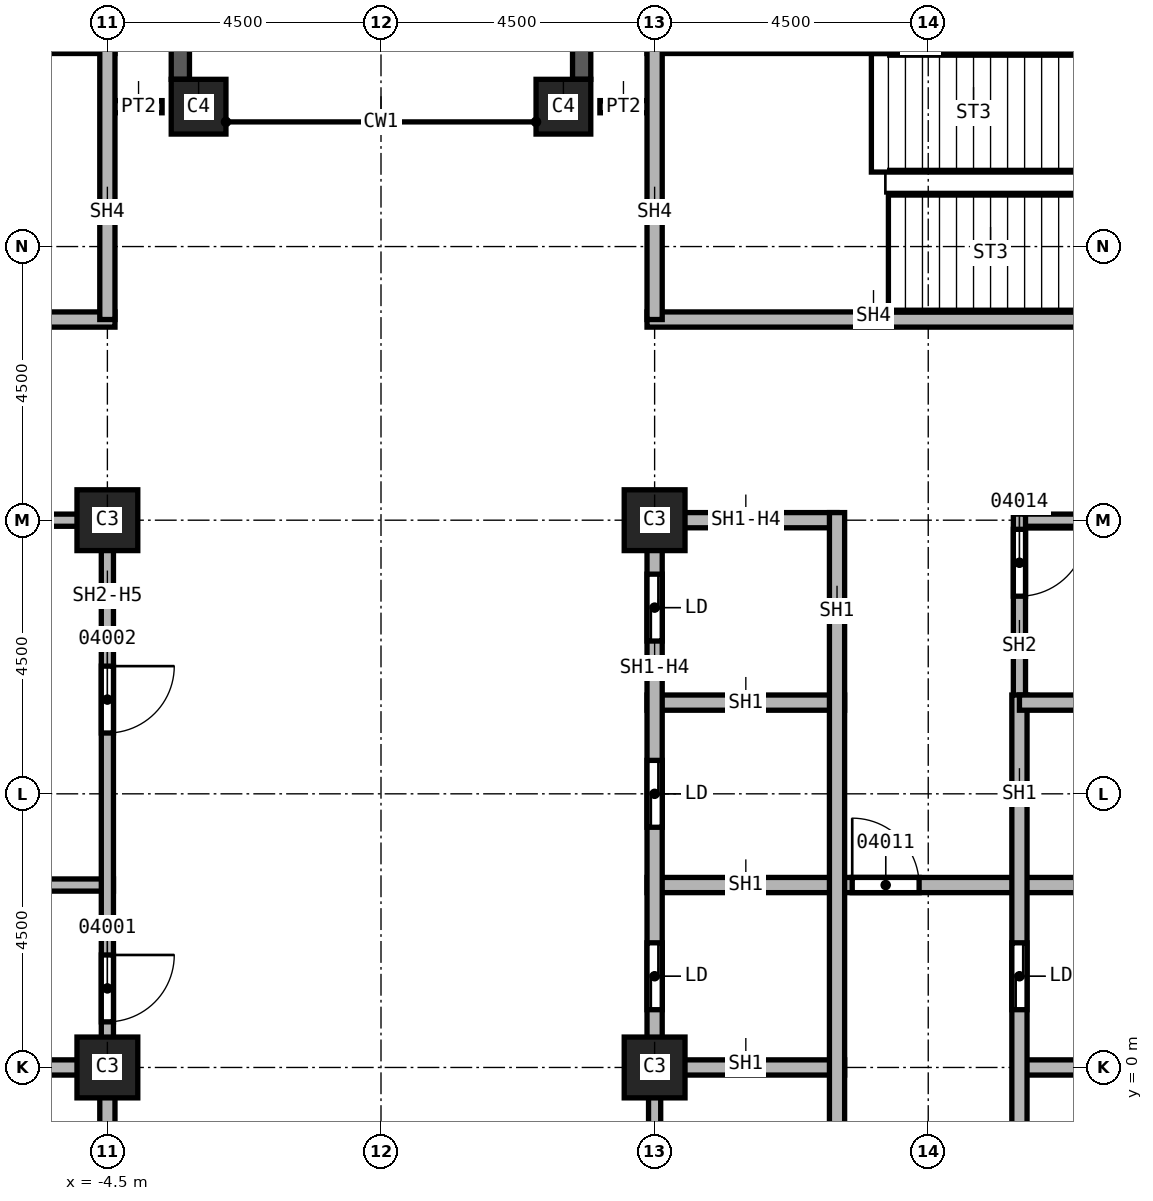
"""IFC4 building model, lengths in metres.
Left out: names, types, materials, properties, quantities, classifications, styles, units other than length and angle.
Written with IfcOpenShell. Run it as: python <this file> out.ifc"""

import sys

from ifc_helpers import new_model, si_unit, direction, frame, frame_2d, origin, origin_2d, place, context, subcontext, project, spatial, rectangle, extrude, element, fill, save


model = new_model("IFC4")
c1 = context("Model", 3, precision=1e-05, world=origin(), true_north=direction((0.0, 1.0)))
c2 = subcontext(c1, "Body", "Model", "MODEL_VIEW")
j1 = project(units=[si_unit("LENGTHUNIT", "METRE"), si_unit("PLANEANGLEUNIT", "RADIAN")], contexts=[c1])
p1 = place(None, origin())
s1 = spatial("IfcSite", under=j1, at=p1, CompositionType="ELEMENT")
p2 = place(p1, origin())
s2 = spatial("IfcBuilding", under=s1, at=p2, CompositionType="ELEMENT")
p3 = place(p2, frame((0.0, 0.0, 104.0)))
s3 = spatial("IfcBuildingStorey", under=s2, at=p3, CompositionType="ELEMENT", Elevation=104.0)
for number, where, z_axis, x_axis in (
    (1, (4.5, 0.0, 0.0), (0.0, 0.0, 1.0), (1.0, 0.0, 0.0)),
    (2, (4.5, 9.0, 0.0), (0.0, 0.0, 1.0), (1.0, 0.0, 0.0)),
    (3, (-4.5, 0.0, 0.0), (0.0, 0.0, 1.0), (1.0, 0.0, 0.0)),
    (4, (-4.5, 9.0, 0.0), (0.0, 0.0, 1.0), (1.0, 0.0, 0.0)),
):
    element("IfcColumn", number, at=place(p3, frame(where, z_axis=z_axis, x_axis=x_axis)), inside=s3, PredefinedType="COLUMN", context=c2, shape_type="SweptSolid", body=[
        extrude(rectangle(XDim=1.0, YDim=1.0, at=origin_2d()), origin(), (0.0, 0.0, 1.0), 3.7),
    ])
for number, where, z_axis, x_axis in (
    (5, (3.0, 15.8, 0.0), (0.0, 0.0, 1.0), (1.0, 0.0, 0.0)),
    (6, (-3.0, 15.8, 0.0), (0.0, 0.0, 1.0), (1.0, 0.0, 0.0)),
):
    element("IfcColumn", number, at=place(p3, frame(where, z_axis=z_axis, x_axis=x_axis)), inside=s3, PredefinedType="COLUMN", context=c2, shape_type="SweptSolid", body=[
        extrude(rectangle(XDim=0.9, YDim=0.9, at=origin_2d()), origin(), (0.0, 0.0, 1.0), 3.7),
    ])
p4 = place(p3, frame((3.3, 24.2, 0.0), z_axis=(0.0, 0.0, 1.0), x_axis=(0.0, -1.0, 0.0)))
e7 = element("IfcWall", 7, at=p4, inside=s3, PredefinedType="SOLIDWALL", context=c2, shape_type="SweptSolid", body=[
    extrude(rectangle(XDim=7.95, YDim=0.3, at=frame_2d((3.975, 0.0))), origin(), (0.0, 0.0, 1.0), 3.1),
])
p5 = place(p4, frame((0.788, 0.0, 0.8)))
e8 = element("IfcOpeningElement", 8, at=p5, cuts=e7, PredefinedType="OPENING", context=c2, shape_type="SweptSolid", body=[
    extrude(rectangle(XDim=2.4, YDim=1.95, at=frame_2d((1.2, 0.975))), frame((0.0, 0.15, 0.0), z_axis=(0.0, -1.0, 0.0), x_axis=(1.0, 0.0, 0.0)), (0.0, 0.0, 1.0), 0.3),
])
p6 = place(p4, frame((4.762, 0.0, 0.8)))
e9 = element("IfcOpeningElement", 9, at=p6, cuts=e7, PredefinedType="OPENING", context=c2, shape_type="SweptSolid", body=[
    extrude(rectangle(XDim=2.4, YDim=1.95, at=frame_2d((1.2, 0.975))), frame((0.0, 0.15, 0.0), z_axis=(0.0, -1.0, 0.0), x_axis=(1.0, 0.0, 0.0)), (0.0, 0.0, 1.0), 0.3),
])
p7 = place(p3, frame((-3.3, 16.25, 0.0), z_axis=(0.0, 0.0, 1.0), x_axis=(0.0, 1.0, 0.0)))
e10 = element("IfcWall", 10, at=p7, inside=s3, PredefinedType="SOLIDWALL", context=c2, shape_type="SweptSolid", body=[
    extrude(rectangle(XDim=7.95, YDim=0.3, at=frame_2d((3.975, 0.0))), origin(), (0.0, 0.0, 1.0), 3.1),
])
p8 = place(p7, frame((0.788, 0.0, 0.8)))
e11 = element("IfcOpeningElement", 11, at=p8, cuts=e10, PredefinedType="OPENING", context=c2, shape_type="SweptSolid", body=[
    extrude(rectangle(XDim=2.4, YDim=1.95, at=frame_2d((1.2, 0.975))), frame((0.0, 0.15, 0.0), z_axis=(0.0, -1.0, 0.0), x_axis=(1.0, 0.0, 0.0)), (0.0, 0.0, 1.0), 0.3),
])
p9 = place(p7, frame((4.762, 0.0, 0.8)))
e12 = element("IfcOpeningElement", 12, at=p9, cuts=e10, PredefinedType="OPENING", context=c2, shape_type="SweptSolid", body=[
    extrude(rectangle(XDim=2.4, YDim=1.95, at=frame_2d((1.2, 0.975))), frame((0.0, 0.15, 0.0), z_axis=(0.0, -1.0, 0.0), x_axis=(1.0, 0.0, 0.0)), (0.0, 0.0, 1.0), 0.3),
])
for number, where, z_axis, x_axis in (
    (13, (-4.5, 15.8, 0.0), (0.0, 0.0, 1.0), (1.0, 0.0, 0.0)),
    (14, (3.6, 15.8, 0.0), (0.0, 0.0, 1.0), (1.0, 0.0, 0.0)),
):
    element("IfcWall", number, at=place(p3, frame(where, z_axis=z_axis, x_axis=x_axis)), inside=s3, PredefinedType="PARTITIONING", context=c2, shape_type="SweptSolid", body=[
        extrude(rectangle(XDim=0.9, YDim=0.2, at=frame_2d((0.45, 0.0))), origin(), (0.0, 0.0, 1.0), 3.7),
    ])
p10 = place(p3, frame((-7.625, 3.0, 0.0), z_axis=(0.0, 0.0, 1.0), x_axis=(1.0, 0.0, 0.0)))
e15 = element("IfcWall", 15, at=p10, inside=s3, PredefinedType="SOLIDWALL", context=c2, shape_type="SweptSolid", body=[
    extrude(rectangle(XDim=3.225, YDim=0.2, at=frame_2d((1.613, 0.0))), origin(), (0.0, 0.0, 1.0), 3.7),
])
p11 = place(p3, frame((-7.5, 9.0, 0.0), z_axis=(0.0, 0.0, 1.0), x_axis=(1.0, 0.0, 0.0)))
e16 = element("IfcWall", 16, at=p11, inside=s3, PredefinedType="SOLIDWALL", context=c2, shape_type="SweptSolid", body=[
    extrude(rectangle(XDim=3.0, YDim=0.2, at=frame_2d((1.5, 0.0))), origin(), (0.0, 0.0, 1.0), 2.938),
])
p12 = place(p3, frame((-4.5, 9.1, 0.0), z_axis=(0.0, 0.0, 1.0), x_axis=(0.0, -1.0, 0.0)))
e17 = element("IfcWall", 17, at=p12, inside=s3, PredefinedType="SOLIDWALL", context=c2, shape_type="SweptSolid", body=[
    extrude(rectangle(XDim=9.1, YDim=0.2, at=frame_2d((4.55, 0.0))), origin(), (0.0, 0.0, 1.0), 2.938),
])
p13 = place(p12, frame((7.25, 0.0, 0.0)))
e18 = element("IfcOpeningElement", 18, at=p13, cuts=e17, PredefinedType="OPENING", context=c2, shape_type="SweptSolid", body=[
    extrude(rectangle(XDim=1.1, YDim=2.1, at=frame_2d((0.55, 1.05))), frame((0.0, 0.1, 0.0), z_axis=(0.0, -1.0, 0.0), x_axis=(1.0, 0.0, 0.0)), (0.0, 0.0, 1.0), 0.2),
])
p14 = place(p12, frame((2.5, 0.0, 0.0)))
e19 = element("IfcOpeningElement", 19, at=p14, cuts=e17, PredefinedType="OPENING", context=c2, shape_type="SweptSolid", body=[
    extrude(rectangle(XDim=1.1, YDim=2.1, at=frame_2d((0.55, 1.05))), frame((0.0, 0.1, 0.0), z_axis=(0.0, -1.0, 0.0), x_axis=(1.0, 0.0, 0.0)), (0.0, 0.0, 1.0), 0.2),
])
p15 = place(p3, frame((4.5, -9.1, 0.0), z_axis=(0.0, 0.0, 1.0), x_axis=(0.0, 1.0, 0.0)))
e20 = element("IfcWall", 20, at=p15, inside=s3, PredefinedType="SOLIDWALL", context=c2, shape_type="SweptSolid", body=[
    extrude(rectangle(XDim=9.1, YDim=0.2, at=frame_2d((4.55, 0.0))), origin(), (0.0, 0.0, 1.0), 2.938),
])
p16 = place(p15, frame((0.85, 0.0, 0.0)))
e21 = element("IfcOpeningElement", 21, at=p16, cuts=e20, PredefinedType="OPENING", context=c2, shape_type="SweptSolid", body=[
    extrude(rectangle(XDim=1.1, YDim=2.1, at=frame_2d((0.55, 1.05))), frame((0.0, 0.1, 0.0), z_axis=(0.0, -1.0, 0.0), x_axis=(1.0, 0.0, 0.0)), (0.0, 0.0, 1.0), 0.2),
])
p17 = place(p15, frame((3.35, 0.0, 0.0)))
e22 = element("IfcOpeningElement", 22, at=p17, cuts=e20, PredefinedType="OPENING", context=c2, shape_type="SweptSolid", body=[
    extrude(rectangle(XDim=1.1, YDim=2.1, at=frame_2d((0.55, 1.05))), frame((0.0, 0.1, 0.0), z_axis=(0.0, -1.0, 0.0), x_axis=(1.0, 0.0, 0.0)), (0.0, 0.0, 1.0), 0.2),
])
p18 = place(p3, frame((10.5, 9.0, 0.0), z_axis=(0.0, 0.0, 1.0), x_axis=(1.0, 0.0, 0.0)))
e23 = element("IfcWall", 23, at=p18, inside=s3, PredefinedType="SOLIDWALL", context=c2, shape_type="SweptSolid", body=[
    extrude(rectangle(XDim=3.0, YDim=0.2, at=frame_2d((1.5, 0.0))), origin(), (0.0, 0.0, 1.0), 2.938),
])
p19 = place(p3, frame((10.5, 9.1, 0.0), z_axis=(0.0, 0.0, 1.0), x_axis=(0.0, -1.0, 0.0)))
e24 = element("IfcWall", 24, at=p19, inside=s3, PredefinedType="SOLIDWALL", context=c2, shape_type="SweptSolid", body=[
    extrude(rectangle(XDim=3.225, YDim=0.2, at=frame_2d((1.613, 0.0))), origin(), (0.0, 0.0, 1.0), 3.7),
])
p20 = place(p19, frame((0.25, 0.0, 0.0)))
e25 = element("IfcOpeningElement", 25, at=p20, cuts=e24, PredefinedType="OPENING", context=c2, shape_type="SweptSolid", body=[
    extrude(rectangle(XDim=1.1, YDim=2.1, at=frame_2d((0.55, 1.05))), frame((0.0, 0.1, 0.0), z_axis=(0.0, -1.0, 0.0), x_axis=(1.0, 0.0, 0.0)), (0.0, 0.0, 1.0), 0.2),
])
p21 = place(p3, frame((-7.625, 0.0, 0.0), z_axis=(0.0, 0.0, 1.0), x_axis=(1.0, 0.0, 0.0)))
e26 = element("IfcWall", 26, at=p21, inside=s3, PredefinedType="SOLIDWALL", context=c2, shape_type="SweptSolid", body=[
    extrude(rectangle(XDim=3.25, YDim=0.25, at=frame_2d((1.625, 0.0))), origin(), (0.0, 0.0, 1.0), 3.7),
])
p22 = place(p3, frame((-4.5, 0.0, 0.0), z_axis=(0.0, 0.0, 1.0), x_axis=(0.0, -1.0, 0.0)))
e27 = element("IfcWall", 27, at=p22, inside=s3, PredefinedType="SOLIDWALL", context=c2, shape_type="SweptSolid", body=[
    extrude(rectangle(XDim=9.125, YDim=0.25, at=frame_2d((4.562, 0.0))), origin(), (0.0, 0.0, 1.0), 2.938),
])
p23 = place(p22, frame((7.012, 0.0, 0.0)))
e28 = element("IfcOpeningElement", 28, at=p23, cuts=e27, PredefinedType="OPENING", context=c2, shape_type="SweptSolid", body=[
    extrude(rectangle(XDim=1.1, YDim=2.1, at=frame_2d((0.55, 1.05))), frame((0.0, 0.125, 0.0), z_axis=(0.0, -1.0, 0.0), x_axis=(1.0, 0.0, 0.0)), (0.0, 0.0, 1.0), 0.25),
])
p24 = place(p22, frame((3.95, 0.0, 0.0)))
e29 = element("IfcOpeningElement", 29, at=p24, cuts=e27, PredefinedType="OPENING", context=c2, shape_type="SweptSolid", body=[
    extrude(rectangle(XDim=1.1, YDim=2.1, at=frame_2d((0.55, 1.05))), frame((0.0, 0.125, 0.0), z_axis=(0.0, -1.0, 0.0), x_axis=(1.0, 0.0, 0.0)), (0.0, 0.0, 1.0), 0.25),
])
p25 = place(p22, frame((0.95, 0.0, 0.0)))
e30 = element("IfcOpeningElement", 30, at=p25, cuts=e27, PredefinedType="OPENING", context=c2, shape_type="SweptSolid", body=[
    extrude(rectangle(XDim=1.1, YDim=2.1, at=frame_2d((0.55, 1.05))), frame((0.0, 0.125, 0.0), z_axis=(0.0, -1.0, 0.0), x_axis=(1.0, 0.0, 0.0)), (0.0, 0.0, 1.0), 0.25),
])
p26 = place(p3, frame((4.375, 0.0, 0.0), z_axis=(0.0, 0.0, 1.0), x_axis=(1.0, 0.0, 0.0)))
e31 = element("IfcWall", 31, at=p26, inside=s3, PredefinedType="SOLIDWALL", context=c2, shape_type="SweptSolid", body=[
    extrude(rectangle(XDim=3.25, YDim=0.25, at=frame_2d((1.625, 0.0))), origin(), (0.0, 0.0, 1.0), 3.7),
])
p27 = place(p3, frame((4.375, 3.0, 0.0), z_axis=(0.0, 0.0, 1.0), x_axis=(1.0, 0.0, 0.0)))
e32 = element("IfcWall", 32, at=p27, inside=s3, PredefinedType="SOLIDWALL", context=c2, shape_type="SweptSolid", body=[
    extrude(rectangle(XDim=9.25, YDim=0.25, at=frame_2d((4.625, 0.0))), origin(), (0.0, 0.0, 1.0), 3.7),
])
p28 = place(p27, frame((3.375, 0.0, 0.0)))
e33 = element("IfcOpeningElement", 33, at=p28, cuts=e32, PredefinedType="OPENING", context=c2, shape_type="SweptSolid", body=[
    extrude(rectangle(XDim=1.1, YDim=2.1, at=frame_2d((0.55, 1.05))), frame((0.0, 0.125, 0.0), z_axis=(0.0, -1.0, 0.0), x_axis=(1.0, 0.0, 0.0)), (0.0, 0.0, 1.0), 0.25),
])
p29 = place(p3, frame((4.375, 6.0, 0.0), z_axis=(0.0, 0.0, 1.0), x_axis=(1.0, 0.0, 0.0)))
e34 = element("IfcWall", 34, at=p29, inside=s3, PredefinedType="SOLIDWALL", context=c2, shape_type="SweptSolid", body=[
    extrude(rectangle(XDim=3.25, YDim=0.25, at=frame_2d((1.625, 0.0))), origin(), (0.0, 0.0, 1.0), 3.7),
])
p30 = place(p3, frame((4.5, 0.0, 0.0), z_axis=(0.0, 0.0, 1.0), x_axis=(0.0, 1.0, 0.0)))
e35 = element("IfcWall", 35, at=p30, inside=s3, PredefinedType="SOLIDWALL", context=c2, shape_type="SweptSolid", body=[
    extrude(rectangle(XDim=9.125, YDim=0.25, at=frame_2d((4.562, 0.0))), origin(), (0.0, 0.0, 1.0), 2.938),
])
p31 = place(p30, frame((0.95, 0.0, 0.0)))
e36 = element("IfcOpeningElement", 36, at=p31, cuts=e35, PredefinedType="OPENING", context=c2, shape_type="SweptSolid", body=[
    extrude(rectangle(XDim=1.1, YDim=2.1, at=frame_2d((0.55, 1.05))), frame((0.0, 0.125, 0.0), z_axis=(0.0, -1.0, 0.0), x_axis=(1.0, 0.0, 0.0)), (0.0, 0.0, 1.0), 0.25),
])
p32 = place(p30, frame((3.95, 0.0, 0.0)))
e37 = element("IfcOpeningElement", 37, at=p32, cuts=e35, PredefinedType="OPENING", context=c2, shape_type="SweptSolid", body=[
    extrude(rectangle(XDim=1.1, YDim=2.1, at=frame_2d((0.55, 1.05))), frame((0.0, 0.125, 0.0), z_axis=(0.0, -1.0, 0.0), x_axis=(1.0, 0.0, 0.0)), (0.0, 0.0, 1.0), 0.25),
])
p33 = place(p30, frame((7.012, 0.0, 0.0)))
e38 = element("IfcOpeningElement", 38, at=p33, cuts=e35, PredefinedType="OPENING", context=c2, shape_type="SweptSolid", body=[
    extrude(rectangle(XDim=1.1, YDim=2.1, at=frame_2d((0.55, 1.05))), frame((0.0, 0.125, 0.0), z_axis=(0.0, -1.0, 0.0), x_axis=(1.0, 0.0, 0.0)), (0.0, 0.0, 1.0), 0.25),
])
p34 = place(p3, frame((4.5, 9.0, 0.0), z_axis=(0.0, 0.0, 1.0), x_axis=(1.0, 0.0, 0.0)))
e39 = element("IfcWall", 39, at=p34, inside=s3, PredefinedType="SOLIDWALL", context=c2, shape_type="SweptSolid", body=[
    extrude(rectangle(XDim=3.0, YDim=0.25, at=frame_2d((1.5, 0.0))), origin(), (0.0, 0.0, 1.0), 2.938),
])
p35 = place(p3, frame((7.5, 9.125, 0.0), z_axis=(0.0, 0.0, 1.0), x_axis=(0.0, -1.0, 0.0)))
e40 = element("IfcWall", 40, at=p35, inside=s3, PredefinedType="SOLIDWALL", context=c2, shape_type="SweptSolid", body=[
    extrude(rectangle(XDim=12.25, YDim=0.25, at=frame_2d((6.125, 0.0))), origin(), (0.0, 0.0, 1.0), 3.7),
])
p36 = place(p3, frame((10.5, 0.0, 0.0), z_axis=(0.0, 0.0, 1.0), x_axis=(1.0, 0.0, 0.0)))
e41 = element("IfcWall", 41, at=p36, inside=s3, PredefinedType="SOLIDWALL", context=c2, shape_type="SweptSolid", body=[
    extrude(rectangle(XDim=3.125, YDim=0.25, at=frame_2d((1.562, 0.0))), origin(), (0.0, 0.0, 1.0), 3.7),
])
p37 = place(p3, frame((10.5, 6.125, 0.0), z_axis=(0.0, 0.0, 1.0), x_axis=(0.0, -1.0, 0.0)))
e42 = element("IfcWall", 42, at=p37, inside=s3, PredefinedType="SOLIDWALL", context=c2, shape_type="SweptSolid", body=[
    extrude(rectangle(XDim=9.25, YDim=0.25, at=frame_2d((4.625, 0.0))), origin(), (0.0, 0.0, 1.0), 3.7),
])
p38 = place(p37, frame((7.075, 0.0, 0.0)))
e43 = element("IfcOpeningElement", 43, at=p38, cuts=e42, PredefinedType="OPENING", context=c2, shape_type="SweptSolid", body=[
    extrude(rectangle(XDim=1.1, YDim=2.1, at=frame_2d((0.55, 1.05))), frame((0.0, 0.125, 0.0), z_axis=(0.0, -1.0, 0.0), x_axis=(1.0, 0.0, 0.0)), (0.0, 0.0, 1.0), 0.25),
])
p39 = place(p37, frame((4.075, 0.0, 0.0)))
e44 = element("IfcOpeningElement", 44, at=p39, cuts=e42, PredefinedType="OPENING", context=c2, shape_type="SweptSolid", body=[
    extrude(rectangle(XDim=1.1, YDim=2.1, at=frame_2d((0.55, 1.05))), frame((0.0, 0.125, 0.0), z_axis=(0.0, -1.0, 0.0), x_axis=(1.0, 0.0, 0.0)), (0.0, 0.0, 1.0), 0.25),
])
p40 = place(p3, frame((10.5, 6.0, 0.0), z_axis=(0.0, 0.0, 1.0), x_axis=(1.0, 0.0, 0.0)))
e45 = element("IfcWall", 45, at=p40, inside=s3, PredefinedType="SOLIDWALL", context=c2, shape_type="SweptSolid", body=[
    extrude(rectangle(XDim=3.125, YDim=0.25, at=frame_2d((1.562, 0.0))), origin(), (0.0, 0.0, 1.0), 3.7),
])
p41 = place(p3, frame((-13.5, 12.3, 0.0), z_axis=(0.0, 0.0, 1.0), x_axis=(1.0, 0.0, 0.0)))
e46 = element("IfcWall", 46, at=p41, inside=s3, PredefinedType="SOLIDWALL", context=c2, shape_type="SweptSolid", body=[
    extrude(rectangle(XDim=9.125, YDim=0.25, at=frame_2d((4.562, 0.0))), origin(), (0.0, 0.0, 1.0), 3.7),
])
p42 = place(p41, frame((0.6, 0.0, 0.0)))
e47 = element("IfcOpeningElement", 47, at=p42, cuts=e46, PredefinedType="OPENING", context=c2, shape_type="SweptSolid", body=[
    extrude(rectangle(XDim=1.2, YDim=2.1, at=frame_2d((0.6, 1.05))), frame((0.0, 0.125, 0.0), z_axis=(0.0, -1.0, 0.0), x_axis=(1.0, 0.0, 0.0)), (0.0, 0.0, 1.0), 0.25),
])
p43 = place(p3, frame((-13.5, 16.8, 0.0), z_axis=(0.0, 0.0, 1.0), x_axis=(1.0, 0.0, 0.0)))
e48 = element("IfcWall", 48, at=p43, inside=s3, PredefinedType="SOLIDWALL", context=c2, shape_type="SweptSolid", body=[
    extrude(rectangle(XDim=9.125, YDim=0.25, at=frame_2d((4.562, 0.0))), origin(), (0.0, 0.0, 1.0), 3.7),
])
p44 = place(p3, frame((-4.5, 16.8, 0.0), z_axis=(0.0, 0.0, 1.0), x_axis=(0.0, -1.0, 0.0)))
e49 = element("IfcWall", 49, at=p44, inside=s3, PredefinedType="SOLIDWALL", context=c2, shape_type="SweptSolid", body=[
    extrude(rectangle(XDim=4.5, YDim=0.25, at=frame_2d((2.25, 0.0))), origin(), (0.0, 0.0, 1.0), 3.7),
])
p45 = place(p3, frame((4.375, 12.3, 0.0), z_axis=(0.0, 0.0, 1.0), x_axis=(1.0, 0.0, 0.0)))
e50 = element("IfcWall", 50, at=p45, inside=s3, PredefinedType="SOLIDWALL", context=c2, shape_type="SweptSolid", body=[
    extrude(rectangle(XDim=9.125, YDim=0.25, at=frame_2d((4.562, 0.0))), origin(), (0.0, 0.0, 1.0), 3.7),
])
p46 = place(p45, frame((7.2, 0.0, 0.0)))
e51 = element("IfcOpeningElement", 51, at=p46, cuts=e50, PredefinedType="OPENING", context=c2, shape_type="SweptSolid", body=[
    extrude(rectangle(XDim=1.2, YDim=2.1, at=frame_2d((0.6, 1.05))), frame((0.0, 0.125, 0.0), z_axis=(0.0, -1.0, 0.0), x_axis=(1.0, 0.0, 0.0)), (0.0, 0.0, 1.0), 0.25),
])
p47 = place(p3, frame((4.375, 16.8, 0.0), z_axis=(0.0, 0.0, 1.0), x_axis=(1.0, 0.0, 0.0)))
e52 = element("IfcWall", 52, at=p47, inside=s3, PredefinedType="SOLIDWALL", context=c2, shape_type="SweptSolid", body=[
    extrude(rectangle(XDim=9.125, YDim=0.25, at=frame_2d((4.562, 0.0))), origin(), (0.0, 0.0, 1.0), 3.7),
])
p48 = place(p3, frame((4.5, 12.3, 0.0), z_axis=(0.0, 0.0, 1.0), x_axis=(0.0, 1.0, 0.0)))
e53 = element("IfcWall", 53, at=p48, inside=s3, PredefinedType="SOLIDWALL", context=c2, shape_type="SweptSolid", body=[
    extrude(rectangle(XDim=4.5, YDim=0.25, at=frame_2d((2.25, 0.0))), origin(), (0.0, 0.0, 1.0), 3.7),
])
p49 = place(p13, origin())
e54 = element("IfcDoor", 54, at=p49, inside=s3, OperationType="SINGLE_SWING_RIGHT", PredefinedType="DOOR", context=c2, shape_type="SweptSolid", body=[
    extrude(rectangle(XDim=1.1, YDim=2.1, at=frame_2d((0.55, 1.05))), frame((0.0, 0.025, 0.0), z_axis=(0.0, -1.0, 0.0), x_axis=(1.0, 0.0, 0.0)), (0.0, 0.0, 1.0), 0.05),
])
fill(e18, e54)
p50 = place(p14, origin())
e55 = element("IfcDoor", 55, at=p50, inside=s3, OperationType="SINGLE_SWING_LEFT", PredefinedType="DOOR", context=c2, shape_type="SweptSolid", body=[
    extrude(rectangle(XDim=1.1, YDim=2.1, at=frame_2d((0.55, 1.05))), frame((0.0, 0.025, 0.0), z_axis=(0.0, -1.0, 0.0), x_axis=(1.0, 0.0, 0.0)), (0.0, 0.0, 1.0), 0.05),
])
fill(e19, e55)
p51 = place(p28, origin())
e56 = element("IfcDoor", 56, at=p51, inside=s3, OperationType="SINGLE_SWING_RIGHT", PredefinedType="DOOR", context=c2, shape_type="SweptSolid", body=[
    extrude(rectangle(XDim=1.1, YDim=2.1, at=frame_2d((0.55, 1.05))), frame((0.0, 0.025, 0.0), z_axis=(0.0, -1.0, 0.0), x_axis=(1.0, 0.0, 0.0)), (0.0, 0.0, 1.0), 0.05),
])
fill(e33, e56)
p52 = place(p20, origin())
e57 = element("IfcDoor", 57, at=p52, inside=s3, OperationType="SINGLE_SWING_LEFT", PredefinedType="DOOR", context=c2, shape_type="SweptSolid", body=[
    extrude(rectangle(XDim=1.1, YDim=2.1, at=frame_2d((0.55, 1.05))), frame((0.0, 0.025, 0.0), z_axis=(0.0, -1.0, 0.0), x_axis=(1.0, 0.0, 0.0)), (0.0, 0.0, 1.0), 0.05),
])
fill(e25, e57)
p53 = place(p31, origin())
e58 = element("IfcDoor", 58, at=p53, inside=s3, OperationType="SLIDING_TO_LEFT", PredefinedType="DOOR", context=c2, shape_type="SweptSolid", body=[
    extrude(rectangle(XDim=1.1, YDim=2.1, at=frame_2d((0.55, 1.05))), frame((0.0, 0.025, 0.0), z_axis=(0.0, -1.0, 0.0), x_axis=(1.0, 0.0, 0.0)), (0.0, 0.0, 1.0), 0.05),
])
fill(e36, e58)
p54 = place(p32, origin())
e59 = element("IfcDoor", 59, at=p54, inside=s3, OperationType="SLIDING_TO_LEFT", PredefinedType="DOOR", context=c2, shape_type="SweptSolid", body=[
    extrude(rectangle(XDim=1.1, YDim=2.1, at=frame_2d((0.55, 1.05))), frame((0.0, 0.025, 0.0), z_axis=(0.0, -1.0, 0.0), x_axis=(1.0, 0.0, 0.0)), (0.0, 0.0, 1.0), 0.05),
])
fill(e37, e59)
p55 = place(p33, origin())
e60 = element("IfcDoor", 60, at=p55, inside=s3, OperationType="SLIDING_TO_LEFT", PredefinedType="DOOR", context=c2, shape_type="SweptSolid", body=[
    extrude(rectangle(XDim=1.1, YDim=2.1, at=frame_2d((0.55, 1.05))), frame((0.0, 0.025, 0.0), z_axis=(0.0, -1.0, 0.0), x_axis=(1.0, 0.0, 0.0)), (0.0, 0.0, 1.0), 0.05),
])
fill(e38, e60)
p56 = place(p39, origin())
e61 = element("IfcDoor", 61, at=p56, inside=s3, OperationType="SLIDING_TO_LEFT", PredefinedType="DOOR", context=c2, shape_type="SweptSolid", body=[
    extrude(rectangle(XDim=1.1, YDim=2.1, at=frame_2d((0.55, 1.05))), frame((0.0, 0.025, 0.0), z_axis=(0.0, -1.0, 0.0), x_axis=(1.0, 0.0, 0.0)), (0.0, 0.0, 1.0), 0.05),
])
fill(e44, e61)
save(model, sys.argv[1])
